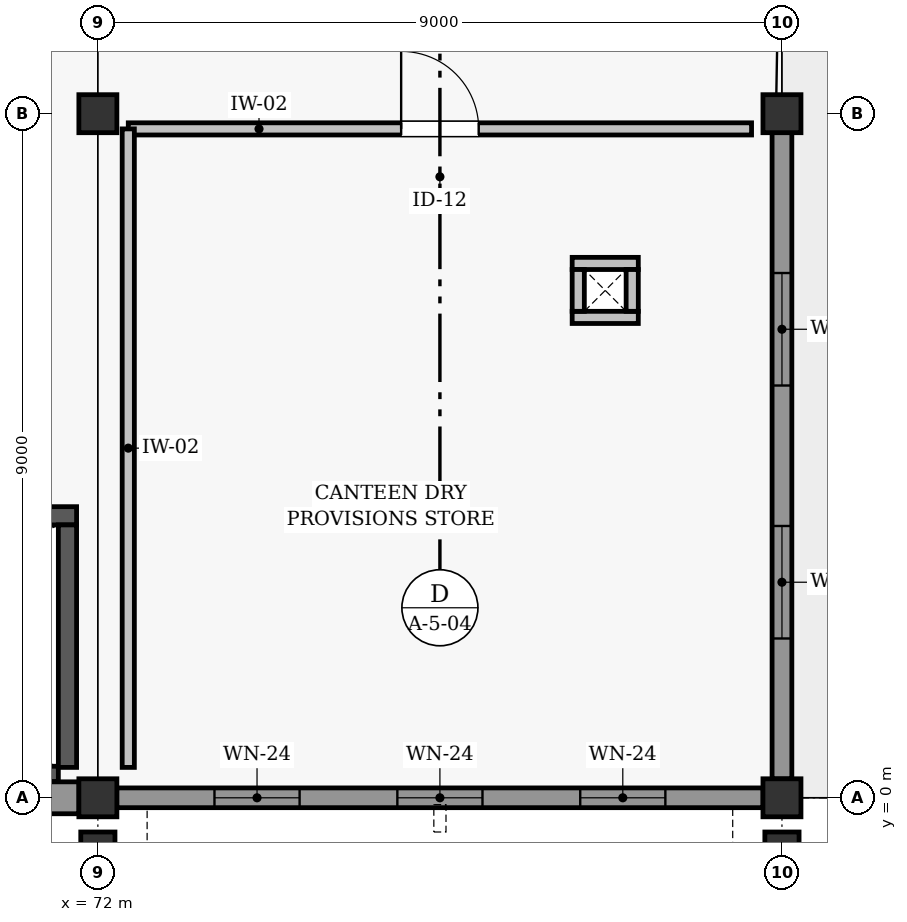
"""IFC4 building model, lengths in metres.
Left out: names, types, materials, properties, quantities, classifications, styles, units other than length and angle.
Written with IfcOpenShell. Run it as: python <this file> out.ifc"""

import sys

from ifc_helpers import new_model, si_unit, direction, frame, frame_2d, origin, origin_2d, place, context, subcontext, project, spatial, rectangle, extrude, element, fill, save


model = new_model("IFC4")
c1 = context("Model", 3, precision=1e-05, world=origin(), true_north=direction((0.0, 1.0)))
c2 = subcontext(c1, "Body", "Model", "MODEL_VIEW")
j1 = project(units=[si_unit("LENGTHUNIT", "METRE"), si_unit("PLANEANGLEUNIT", "RADIAN")], contexts=[c1])
p1 = place(None, origin())
s1 = spatial("IfcSite", under=j1, at=p1, CompositionType="ELEMENT")
p2 = place(p1, origin())
s2 = spatial("IfcBuilding", under=s1, at=p2, CompositionType="ELEMENT")
p3 = place(p2, frame((0.0, 0.0, 12.0)))
s3 = spatial("IfcBuildingStorey", under=s2, at=p3, CompositionType="ELEMENT", Elevation=12.0)
for number, where, z_axis, x_axis in (
    (1, (72.0, 0.0, 0.0), (0.0, 0.0, 1.0), (1.0, 0.0, 0.0)),
    (2, (72.0, 9.0, 0.0), (0.0, 0.0, 1.0), (1.0, 0.0, 0.0)),
    (3, (81.0, 0.0, 0.0), (0.0, 0.0, 1.0), (1.0, 0.0, 0.0)),
    (4, (81.0, 9.0, 0.0), (0.0, 0.0, 1.0), (1.0, 0.0, 0.0)),
):
    element("IfcColumn", number, at=place(p3, frame(where, z_axis=z_axis, x_axis=x_axis)), inside=s3, PredefinedType="COLUMN", context=c2, shape_type="SweptSolid", body=[
        extrude(rectangle(XDim=0.5, YDim=0.5, at=origin_2d()), origin(), (0.0, 0.0, 1.0), 3.0),
    ])
for number, where, z_axis, x_axis in (
    (5, (72.0, -0.75, 0.0), (0.0, 0.0, 1.0), (1.0, 0.0, 0.0)),
    (6, (81.0, -0.75, 0.0), (0.0, 0.0, 1.0), (1.0, 0.0, 0.0)),
):
    element("IfcColumn", number, at=place(p3, frame(where, z_axis=z_axis, x_axis=x_axis)), inside=s3, PredefinedType="PILASTER", context=c2, shape_type="SweptSolid", body=[
        extrude(rectangle(XDim=0.45, YDim=0.6, at=origin_2d()), origin(), (0.0, 0.0, 1.0), 3.95),
    ])
p4 = place(p3, frame((63.248, 0.0, 0.0), z_axis=(0.0, 0.0, 1.0), x_axis=(1.0, 0.0, 0.0)))
e7 = element("IfcWall", 7, at=p4, inside=s3, PredefinedType="SOLIDWALL", context=c2, shape_type="SweptSolid", body=[
    extrude(rectangle(XDim=8.504, YDim=0.42, at=frame_2d((4.252, 0.0))), origin(), (0.0, 0.0, 1.0), 2.322),
])
p5 = place(p3, frame((72.248, 0.0, 0.0), z_axis=(0.0, 0.0, 1.0), x_axis=(1.0, 0.0, 0.0)))
e8 = element("IfcWall", 8, at=p5, inside=s3, PredefinedType="SOLIDWALL", context=c2, shape_type="SweptSolid", body=[
    extrude(rectangle(XDim=8.504, YDim=0.26, at=frame_2d((4.252, 0.0))), origin(), (0.0, 0.0, 1.0), 2.302),
])
p6 = place(p5, frame((1.286, 0.0, 0.8)))
e9 = element("IfcOpeningElement", 9, at=p6, cuts=e8, PredefinedType="OPENING", context=c2, shape_type="SweptSolid", body=[
    extrude(rectangle(XDim=1.12, YDim=1.08, at=frame_2d((0.56, 0.54))), frame((0.0, 0.14, 0.0), z_axis=(0.0, -1.0, 0.0), x_axis=(1.0, 0.0, 0.0)), (0.0, 0.0, 1.0), 0.28),
])
p7 = place(p5, frame((3.692, 0.0, 0.8)))
e10 = element("IfcOpeningElement", 10, at=p7, cuts=e8, PredefinedType="OPENING", context=c2, shape_type="SweptSolid", body=[
    extrude(rectangle(XDim=1.12, YDim=1.08, at=frame_2d((0.56, 0.54))), frame((0.0, 0.14, 0.0), z_axis=(0.0, -1.0, 0.0), x_axis=(1.0, 0.0, 0.0)), (0.0, 0.0, 1.0), 0.28),
])
p8 = place(p5, frame((6.098, 0.0, 0.8)))
e11 = element("IfcOpeningElement", 11, at=p8, cuts=e8, PredefinedType="OPENING", context=c2, shape_type="SweptSolid", body=[
    extrude(rectangle(XDim=1.12, YDim=1.08, at=frame_2d((0.56, 0.54))), frame((0.0, 0.14, 0.0), z_axis=(0.0, -1.0, 0.0), x_axis=(1.0, 0.0, 0.0)), (0.0, 0.0, 1.0), 0.28),
])
p9 = place(p3, frame((81.0, 0.248, 0.0), z_axis=(0.0, 0.0, 1.0), x_axis=(0.0, 1.0, 0.0)))
e12 = element("IfcWall", 12, at=p9, inside=s3, PredefinedType="SOLIDWALL", context=c2, shape_type="SweptSolid", body=[
    extrude(rectangle(XDim=8.504, YDim=0.26, at=frame_2d((4.252, 0.0))), origin(), (0.0, 0.0, 1.0), 2.302),
])
p10 = place(p9, frame((1.848, 0.0, 0.56)))
e13 = element("IfcOpeningElement", 13, at=p10, cuts=e12, PredefinedType="OPENING", context=c2, shape_type="SweptSolid", body=[
    extrude(rectangle(XDim=1.48, YDim=1.56, at=frame_2d((0.74, 0.78))), frame((0.0, 0.14, 0.0), z_axis=(0.0, -1.0, 0.0), x_axis=(1.0, 0.0, 0.0)), (0.0, 0.0, 1.0), 0.28),
])
p11 = place(p9, frame((5.176, 0.0, 0.56)))
e14 = element("IfcOpeningElement", 14, at=p11, cuts=e12, PredefinedType="OPENING", context=c2, shape_type="SweptSolid", body=[
    extrude(rectangle(XDim=1.48, YDim=1.56, at=frame_2d((0.74, 0.78))), frame((0.0, 0.14, 0.0), z_axis=(0.0, -1.0, 0.0), x_axis=(1.0, 0.0, 0.0)), (0.0, 0.0, 1.0), 0.28),
])
p12 = place(p3, frame((65.04, 0.315, 0.0), z_axis=(0.0, 0.0, 1.0), x_axis=(1.0, 0.0, 0.0)))
e15 = element("IfcWall", 15, at=p12, inside=s3, PredefinedType="SHEAR", context=c2, shape_type="SweptSolid", body=[
    extrude(rectangle(XDim=6.44, YDim=0.2, at=frame_2d((3.22, 0.0))), origin(), (0.0, 0.0, 1.0), 2.75),
])
p13 = place(p3, frame((63.28, 3.71, 0.0), z_axis=(0.0, 0.0, 1.0), x_axis=(1.0, 0.0, 0.0)))
e16 = element("IfcWall", 16, at=p13, inside=s3, PredefinedType="SHEAR", context=c2, shape_type="SweptSolid", body=[
    extrude(rectangle(XDim=8.44, YDim=0.24, at=frame_2d((4.22, 0.0))), origin(), (0.0, 0.0, 1.0), 2.75),
])
p14 = place(p13, frame((0.46, 0.0, 0.0)))
e17 = element("IfcOpeningElement", 17, at=p14, cuts=e16, PredefinedType="OPENING", context=c2, shape_type="SweptSolid", body=[
    extrude(rectangle(XDim=1.08, YDim=2.08, at=frame_2d((0.54, 1.04))), frame((0.0, 0.13, 0.0), z_axis=(0.0, -1.0, 0.0), x_axis=(1.0, 0.0, 0.0)), (0.0, 0.0, 1.0), 0.26),
])
p15 = place(p3, frame((71.6, 0.4, 0.0), z_axis=(0.0, 0.0, 1.0), x_axis=(0.0, 1.0, 0.0)))
e18 = element("IfcWall", 18, at=p15, inside=s3, PredefinedType="SHEAR", context=c2, shape_type="SweptSolid", body=[
    extrude(rectangle(XDim=3.19, YDim=0.24, at=frame_2d((1.595, 0.0))), origin(), (0.0, 0.0, 1.0), 2.75),
])
for number, where, z_axis, x_axis in (
    (19, (78.24, 6.32, 0.0), (0.0, 0.0, 1.0), (1.0, 0.0, 0.0)),
    (20, (78.24, 7.03, 0.0), (0.0, 0.0, 1.0), (1.0, 0.0, 0.0)),
):
    element("IfcWall", number, at=place(p3, frame(where, z_axis=z_axis, x_axis=x_axis)), inside=s3, PredefinedType="PARTITIONING", context=c2, shape_type="SweptSolid", body=[
        extrude(rectangle(XDim=0.87, YDim=0.16, at=frame_2d((0.435, 0.0))), origin(), (0.0, 0.0, 1.0), 2.75),
    ])
for number, where, z_axis, x_axis in (
    (21, (78.32, 6.4, 0.0), (0.0, 0.0, 1.0), (0.0, 1.0, 0.0)),
    (22, (79.03, 6.4, 0.0), (0.0, 0.0, 1.0), (0.0, 1.0, 0.0)),
):
    element("IfcWall", number, at=place(p3, frame(where, z_axis=z_axis, x_axis=x_axis)), inside=s3, PredefinedType="PARTITIONING", context=c2, shape_type="SweptSolid", body=[
        extrude(rectangle(XDim=0.55, YDim=0.16, at=frame_2d((0.275, 0.0))), origin(), (0.0, 0.0, 1.0), 2.75),
    ])
p16 = place(p3, frame((72.4, 8.8, 0.0), z_axis=(0.0, 0.0, 1.0), x_axis=(1.0, 0.0, 0.0)))
e23 = element("IfcWall", 23, at=p16, inside=s3, PredefinedType="PARTITIONING", context=c2, shape_type="SweptSolid", body=[
    extrude(rectangle(XDim=8.2, YDim=0.16, at=frame_2d((4.1, 0.0))), origin(), (0.0, 0.0, 1.0), 2.305),
])
p17 = place(p16, frame((3.59, 0.0, 0.0)))
e24 = element("IfcOpeningElement", 24, at=p17, cuts=e23, PredefinedType="OPENING", context=c2, shape_type="SweptSolid", body=[
    extrude(rectangle(XDim=1.02, YDim=2.1, at=frame_2d((0.51, 1.05))), frame((0.0, 0.09, 0.0), z_axis=(0.0, -1.0, 0.0), x_axis=(1.0, 0.0, 0.0)), (0.0, 0.0, 1.0), 0.18),
])
p18 = place(p3, frame((72.4, 0.4, 0.0), z_axis=(0.0, 0.0, 1.0), x_axis=(0.0, 1.0, 0.0)))
e25 = element("IfcWall", 25, at=p18, inside=s3, PredefinedType="PARTITIONING", context=c2, shape_type="SweptSolid", body=[
    extrude(rectangle(XDim=8.4, YDim=0.16, at=frame_2d((4.2, 0.0))), origin(), (0.0, 0.0, 1.0), 2.305),
])
p19 = place(p6, origin())
e26 = element("IfcWindow", 26, at=p19, inside=s3, PartitioningType="SINGLE_PANEL", PredefinedType="WINDOW", context=c2, shape_type="SweptSolid", body=[
    extrude(rectangle(XDim=1.12, YDim=1.08, at=frame_2d((0.56, 0.54))), frame((0.0, 0.03, 0.0), z_axis=(0.0, -1.0, 0.0), x_axis=(1.0, 0.0, 0.0)), (0.0, 0.0, 1.0), 0.06),
])
fill(e9, e26)
p20 = place(p7, origin())
e27 = element("IfcWindow", 27, at=p20, inside=s3, PartitioningType="SINGLE_PANEL", PredefinedType="WINDOW", context=c2, shape_type="SweptSolid", body=[
    extrude(rectangle(XDim=1.12, YDim=1.08, at=frame_2d((0.56, 0.54))), frame((0.0, 0.03, 0.0), z_axis=(0.0, -1.0, 0.0), x_axis=(1.0, 0.0, 0.0)), (0.0, 0.0, 1.0), 0.06),
])
fill(e10, e27)
p21 = place(p8, origin())
e28 = element("IfcWindow", 28, at=p21, inside=s3, PartitioningType="SINGLE_PANEL", PredefinedType="WINDOW", context=c2, shape_type="SweptSolid", body=[
    extrude(rectangle(XDim=1.12, YDim=1.08, at=frame_2d((0.56, 0.54))), frame((0.0, 0.03, 0.0), z_axis=(0.0, -1.0, 0.0), x_axis=(1.0, 0.0, 0.0)), (0.0, 0.0, 1.0), 0.06),
])
fill(e11, e28)
p22 = place(p10, origin())
e29 = element("IfcWindow", 29, at=p22, inside=s3, PartitioningType="SINGLE_PANEL", PredefinedType="WINDOW", context=c2, shape_type="SweptSolid", body=[
    extrude(rectangle(XDim=1.48, YDim=1.56, at=frame_2d((0.74, 0.78))), frame((0.0, 0.03, 0.0), z_axis=(0.0, -1.0, 0.0), x_axis=(1.0, 0.0, 0.0)), (0.0, 0.0, 1.0), 0.06),
])
fill(e13, e29)
p23 = place(p11, origin())
e30 = element("IfcWindow", 30, at=p23, inside=s3, PartitioningType="SINGLE_PANEL", PredefinedType="WINDOW", context=c2, shape_type="SweptSolid", body=[
    extrude(rectangle(XDim=1.48, YDim=1.56, at=frame_2d((0.74, 0.78))), frame((0.0, 0.03, 0.0), z_axis=(0.0, -1.0, 0.0), x_axis=(1.0, 0.0, 0.0)), (0.0, 0.0, 1.0), 0.06),
])
fill(e14, e30)
p24 = place(p17, origin())
e31 = element("IfcDoor", 31, at=p24, inside=s3, OperationType="SINGLE_SWING_LEFT", PredefinedType="DOOR", context=c2, shape_type="SweptSolid", body=[
    extrude(rectangle(XDim=1.02, YDim=2.1, at=frame_2d((0.51, 1.05))), frame((0.0, 0.025, 0.0), z_axis=(0.0, -1.0, 0.0), x_axis=(1.0, 0.0, 0.0)), (0.0, 0.0, 1.0), 0.05),
])
fill(e24, e31)
save(model, sys.argv[1])
